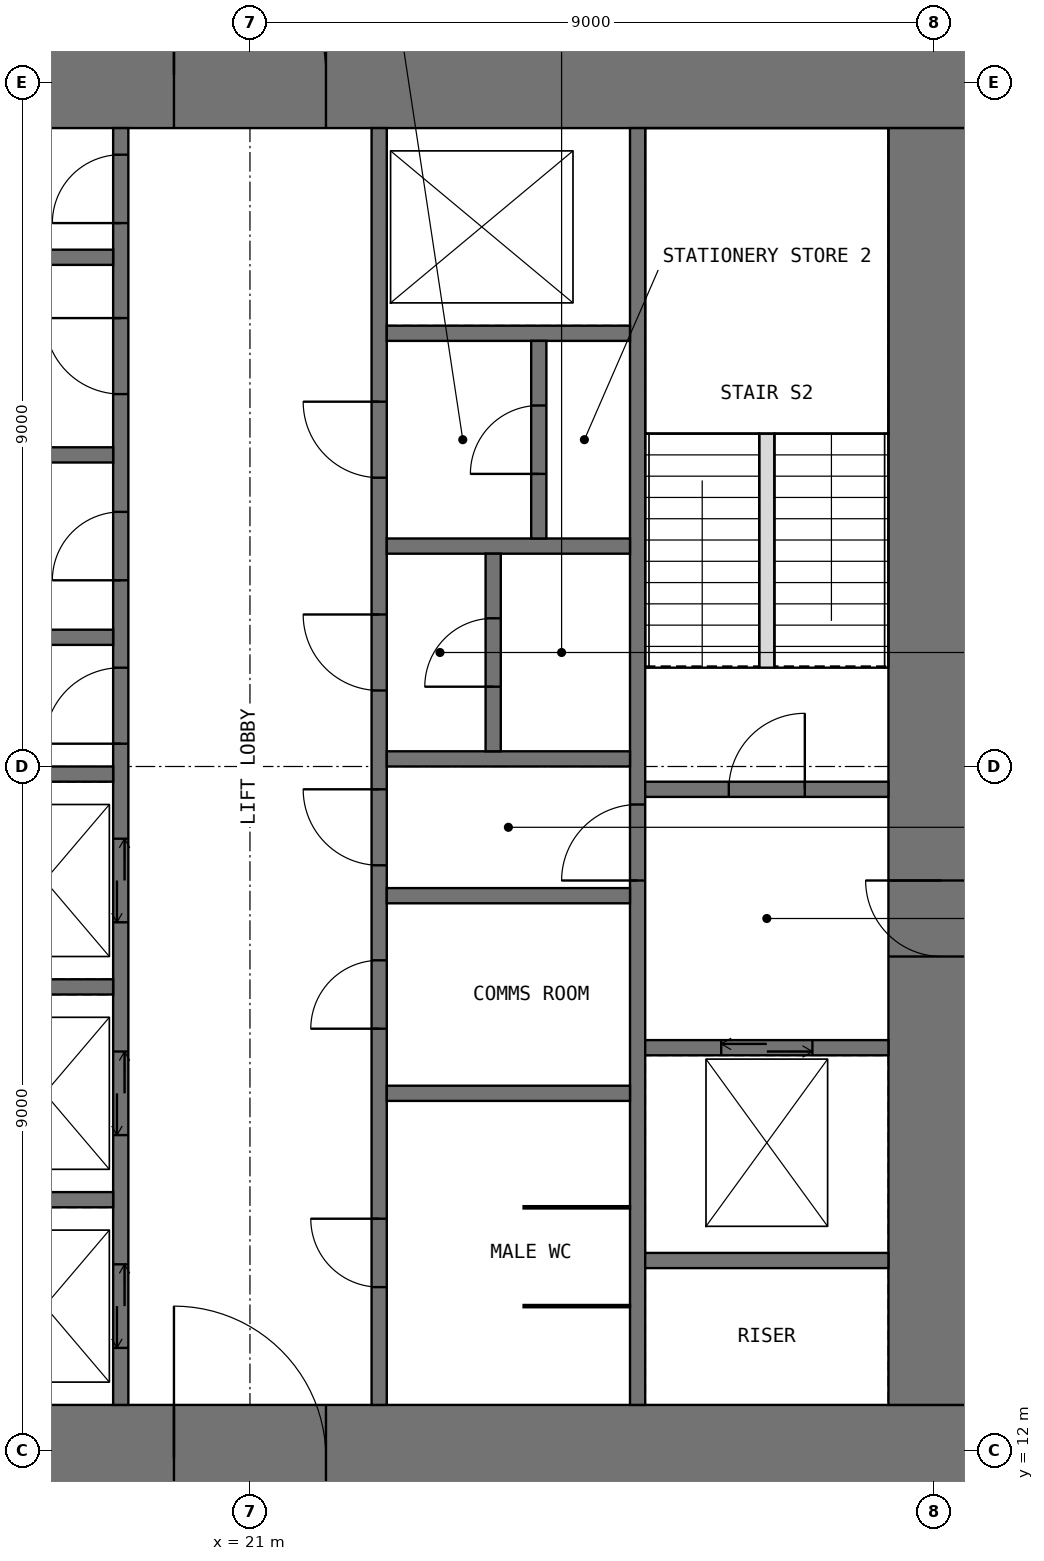
"""IFC4 building model, lengths in metres.
Left out: names, types, materials, properties, quantities, classifications, styles, units other than length and angle.
Written with IfcOpenShell. Run it as: python <this file> out.ifc"""

import sys

from ifc_helpers import new_model, si_unit, direction, frame, frame_2d, origin, place, context, subcontext, project, spatial, rectangle, extrude, element, fill, save


model = new_model("IFC4")
c1 = context("Model", 3, precision=1e-05, world=origin(), true_north=direction((0.0, 1.0)))
c2 = subcontext(c1, "Body", "Model", "MODEL_VIEW")
j1 = project(units=[si_unit("LENGTHUNIT", "METRE"), si_unit("PLANEANGLEUNIT", "RADIAN")], contexts=[c1])
p1 = place(None, origin())
s1 = spatial("IfcSite", under=j1, at=p1, CompositionType="ELEMENT")
p2 = place(p1, origin())
s2 = spatial("IfcBuilding", under=s1, at=p2, CompositionType="ELEMENT")
p3 = place(p2, frame((0.0, 0.0, 178.5)))
s3 = spatial("IfcBuildingStorey", under=s2, at=p3, CompositionType="ELEMENT", Elevation=178.5)
p4 = place(p3, frame((11.2, 11.9, -0.05), z_axis=(0.0, 0.0, 1.0), x_axis=(1.0, 0.0, 0.0)))
e1 = element("IfcWall", 1, at=p4, inside=s3, PredefinedType="SHEAR", context=c2, shape_type="SweptSolid", body=[
    extrude(rectangle(XDim=19.6, YDim=1.4, at=frame_2d((9.8, 0.0))), origin(), (0.0, 0.0, 1.0), 4.0),
])
p5 = place(p4, frame((8.8, 0.0, 0.05)))
e2 = element("IfcOpeningElement", 2, at=p5, cuts=e1, PredefinedType="OPENING", context=c2, shape_type="SweptSolid", body=[
    extrude(rectangle(XDim=2.0, YDim=2.2, at=frame_2d((1.0, 1.1))), frame((0.0, 0.71, 0.0), z_axis=(0.0, -1.0, 0.0), x_axis=(1.0, 0.0, 0.0)), (0.0, 0.0, 1.0), 1.42),
])
p6 = place(p3, frame((11.2, 30.1, -0.05), z_axis=(0.0, 0.0, 1.0), x_axis=(1.0, 0.0, 0.0)))
e3 = element("IfcWall", 3, at=p6, inside=s3, PredefinedType="SHEAR", context=c2, shape_type="SweptSolid", body=[
    extrude(rectangle(XDim=19.6, YDim=1.4, at=frame_2d((9.8, 0.0))), origin(), (0.0, 0.0, 1.0), 4.0),
])
p7 = place(p6, frame((8.8, 0.0, 0.05)))
e4 = element("IfcOpeningElement", 4, at=p7, cuts=e3, PredefinedType="OPENING", context=c2, shape_type="SweptSolid", body=[
    extrude(rectangle(XDim=2.0, YDim=2.2, at=frame_2d((1.0, 1.1))), frame((0.0, 0.71, 0.0), z_axis=(0.0, -1.0, 0.0), x_axis=(1.0, 0.0, 0.0)), (0.0, 0.0, 1.0), 1.42),
])
p8 = place(p3, frame((30.1, 12.6, -0.05), z_axis=(0.0, 0.0, 1.0), x_axis=(0.0, 1.0, 0.0)))
e5 = element("IfcWall", 5, at=p8, inside=s3, PredefinedType="SHEAR", context=c2, shape_type="SweptSolid", body=[
    extrude(rectangle(XDim=16.8, YDim=1.4, at=frame_2d((8.4, 0.0))), origin(), (0.0, 0.0, 1.0), 4.0),
])
p9 = place(p8, frame((5.9, 0.0, 0.05)))
e6 = element("IfcOpeningElement", 6, at=p9, cuts=e5, PredefinedType="OPENING", context=c2, shape_type="SweptSolid", body=[
    extrude(rectangle(XDim=1.0, YDim=2.2, at=frame_2d((0.5, 1.1))), frame((0.0, 0.71, 0.0), z_axis=(0.0, -1.0, 0.0), x_axis=(1.0, 0.0, 0.0)), (0.0, 0.0, 1.0), 1.42),
])
p10 = place(p3, frame((19.3, 12.6, -0.05), z_axis=(0.0, 0.0, 1.0), x_axis=(0.0, 1.0, 0.0)))
e7 = element("IfcWall", 7, at=p10, inside=s3, PredefinedType="SHEAR", context=c2, shape_type="SweptSolid", body=[
    extrude(rectangle(XDim=16.8, YDim=0.2, at=frame_2d((8.4, 0.0))), origin(), (0.0, 0.0, 1.0), 4.0),
])
p11 = place(p10, frame((8.7, 0.0, 0.05)))
e8 = element("IfcOpeningElement", 8, at=p11, cuts=e7, PredefinedType="OPENING", context=c2, shape_type="SweptSolid", body=[
    extrude(rectangle(XDim=1.0, YDim=2.2, at=frame_2d((0.5, 1.1))), frame((0.0, 0.11, 0.0), z_axis=(0.0, -1.0, 0.0), x_axis=(1.0, 0.0, 0.0)), (0.0, 0.0, 1.0), 0.22),
])
p12 = place(p10, frame((10.85, 0.0, 0.05)))
e9 = element("IfcOpeningElement", 9, at=p12, cuts=e7, PredefinedType="OPENING", context=c2, shape_type="SweptSolid", body=[
    extrude(rectangle(XDim=0.9, YDim=2.2, at=frame_2d((0.45, 1.1))), frame((0.0, 0.11, 0.0), z_axis=(0.0, -1.0, 0.0), x_axis=(1.0, 0.0, 0.0)), (0.0, 0.0, 1.0), 0.22),
])
p13 = place(p10, frame((13.3, 0.0, 0.05)))
e10 = element("IfcOpeningElement", 10, at=p13, cuts=e7, PredefinedType="OPENING", context=c2, shape_type="SweptSolid", body=[
    extrude(rectangle(XDim=1.0, YDim=2.2, at=frame_2d((0.5, 1.1))), frame((0.0, 0.11, 0.0), z_axis=(0.0, -1.0, 0.0), x_axis=(1.0, 0.0, 0.0)), (0.0, 0.0, 1.0), 0.22),
])
p14 = place(p10, frame((15.55, 0.0, 0.05)))
e11 = element("IfcOpeningElement", 11, at=p14, cuts=e7, PredefinedType="OPENING", context=c2, shape_type="SweptSolid", body=[
    extrude(rectangle(XDim=0.9, YDim=2.2, at=frame_2d((0.45, 1.1))), frame((0.0, 0.11, 0.0), z_axis=(0.0, -1.0, 0.0), x_axis=(1.0, 0.0, 0.0)), (0.0, 0.0, 1.0), 0.22),
])
p15 = place(p10, frame((0.75, 0.0, 0.05)))
e12 = element("IfcOpeningElement", 12, at=p15, cuts=e7, PredefinedType="OPENING", context=c2, shape_type="SweptSolid", body=[
    extrude(rectangle(XDim=1.1, YDim=2.2, at=frame_2d((0.55, 1.1))), frame((0.0, 0.11, 0.0), z_axis=(0.0, -1.0, 0.0), x_axis=(1.0, 0.0, 0.0)), (0.0, 0.0, 1.0), 0.22),
])
p16 = place(p10, frame((3.55, 0.0, 0.05)))
e13 = element("IfcOpeningElement", 13, at=p16, cuts=e7, PredefinedType="OPENING", context=c2, shape_type="SweptSolid", body=[
    extrude(rectangle(XDim=1.1, YDim=2.2, at=frame_2d((0.55, 1.1))), frame((0.0, 0.11, 0.0), z_axis=(0.0, -1.0, 0.0), x_axis=(1.0, 0.0, 0.0)), (0.0, 0.0, 1.0), 0.22),
])
p17 = place(p10, frame((6.35, 0.0, 0.05)))
e14 = element("IfcOpeningElement", 14, at=p17, cuts=e7, PredefinedType="OPENING", context=c2, shape_type="SweptSolid", body=[
    extrude(rectangle(XDim=1.1, YDim=2.2, at=frame_2d((0.55, 1.1))), frame((0.0, 0.11, 0.0), z_axis=(0.0, -1.0, 0.0), x_axis=(1.0, 0.0, 0.0)), (0.0, 0.0, 1.0), 0.22),
])
p18 = place(p3, frame((22.7, 12.6, -0.05), z_axis=(0.0, 0.0, 1.0), x_axis=(0.0, 1.0, 0.0)))
e15 = element("IfcWall", 15, at=p18, inside=s3, PredefinedType="SHEAR", context=c2, shape_type="SweptSolid", body=[
    extrude(rectangle(XDim=16.8, YDim=0.2, at=frame_2d((8.4, 0.0))), origin(), (0.0, 0.0, 1.0), 4.0),
])
p19 = place(p18, frame((7.1, 0.0, 0.05)))
e16 = element("IfcOpeningElement", 16, at=p19, cuts=e15, PredefinedType="OPENING", context=c2, shape_type="SweptSolid", body=[
    extrude(rectangle(XDim=1.0, YDim=2.2, at=frame_2d((0.5, 1.1))), frame((0.0, 0.11, 0.0), z_axis=(0.0, -1.0, 0.0), x_axis=(1.0, 0.0, 0.0)), (0.0, 0.0, 1.0), 0.22),
])
p20 = place(p18, frame((1.55, 0.0, 0.05)))
e17 = element("IfcOpeningElement", 17, at=p20, cuts=e15, PredefinedType="OPENING", context=c2, shape_type="SweptSolid", body=[
    extrude(rectangle(XDim=0.9, YDim=2.2, at=frame_2d((0.45, 1.1))), frame((0.0, 0.11, 0.0), z_axis=(0.0, -1.0, 0.0), x_axis=(1.0, 0.0, 0.0)), (0.0, 0.0, 1.0), 0.22),
])
p21 = place(p18, frame((4.95, 0.0, 0.05)))
e18 = element("IfcOpeningElement", 18, at=p21, cuts=e15, PredefinedType="OPENING", context=c2, shape_type="SweptSolid", body=[
    extrude(rectangle(XDim=0.9, YDim=2.2, at=frame_2d((0.45, 1.1))), frame((0.0, 0.11, 0.0), z_axis=(0.0, -1.0, 0.0), x_axis=(1.0, 0.0, 0.0)), (0.0, 0.0, 1.0), 0.22),
])
p22 = place(p18, frame((9.4, 0.0, 0.05)))
e19 = element("IfcOpeningElement", 19, at=p22, cuts=e15, PredefinedType="OPENING", context=c2, shape_type="SweptSolid", body=[
    extrude(rectangle(XDim=1.0, YDim=2.2, at=frame_2d((0.5, 1.1))), frame((0.0, 0.11, 0.0), z_axis=(0.0, -1.0, 0.0), x_axis=(1.0, 0.0, 0.0)), (0.0, 0.0, 1.0), 0.22),
])
p23 = place(p18, frame((12.2, 0.0, 0.05)))
e20 = element("IfcOpeningElement", 20, at=p23, cuts=e15, PredefinedType="OPENING", context=c2, shape_type="SweptSolid", body=[
    extrude(rectangle(XDim=1.0, YDim=2.2, at=frame_2d((0.5, 1.1))), frame((0.0, 0.11, 0.0), z_axis=(0.0, -1.0, 0.0), x_axis=(1.0, 0.0, 0.0)), (0.0, 0.0, 1.0), 0.22),
])
p24 = place(p3, frame((26.1, 12.6, -0.05), z_axis=(0.0, 0.0, 1.0), x_axis=(0.0, 1.0, 0.0)))
e21 = element("IfcWall", 21, at=p24, inside=s3, PredefinedType="SHEAR", context=c2, shape_type="SweptSolid", body=[
    extrude(rectangle(XDim=16.8, YDim=0.2, at=frame_2d((8.4, 0.0))), origin(), (0.0, 0.0, 1.0), 4.0),
])
p25 = place(p24, frame((6.9, 0.0, 0.05)))
e22 = element("IfcOpeningElement", 22, at=p25, cuts=e21, PredefinedType="OPENING", context=c2, shape_type="SweptSolid", body=[
    extrude(rectangle(XDim=1.0, YDim=2.2, at=frame_2d((0.5, 1.1))), frame((0.0, 0.11, 0.0), z_axis=(0.0, -1.0, 0.0), x_axis=(1.0, 0.0, 0.0)), (0.0, 0.0, 1.0), 0.22),
])
for number, where, z_axis, x_axis in (
    (23, (16.0, 15.3, -0.05), (0.0, 0.0, 1.0), (1.0, 0.0, 0.0)),
    (24, (16.0, 18.1, -0.05), (0.0, 0.0, 1.0), (1.0, 0.0, 0.0)),
    (25, (16.0, 20.9, -0.05), (0.0, 0.0, 1.0), (1.0, 0.0, 0.0)),
    (26, (16.0, 22.7, -0.05), (0.0, 0.0, 1.0), (1.0, 0.0, 0.0)),
    (27, (16.0, 25.1, -0.05), (0.0, 0.0, 1.0), (1.0, 0.0, 0.0)),
    (28, (16.0, 27.7, -0.05), (0.0, 0.0, 1.0), (1.0, 0.0, 0.0)),
    (29, (22.8, 16.7, -0.05), (0.0, 0.0, 1.0), (1.0, 0.0, 0.0)),
    (30, (22.8, 19.3, -0.05), (0.0, 0.0, 1.0), (1.0, 0.0, 0.0)),
    (31, (22.8, 21.1, -0.05), (0.0, 0.0, 1.0), (1.0, 0.0, 0.0)),
    (32, (22.8, 23.9, -0.05), (0.0, 0.0, 1.0), (1.0, 0.0, 0.0)),
    (33, (22.8, 26.7, -0.05), (0.0, 0.0, 1.0), (1.0, 0.0, 0.0)),
    (34, (26.2, 14.5, -0.05), (0.0, 0.0, 1.0), (1.0, 0.0, 0.0)),
):
    element("IfcWall", number, at=place(p3, frame(where, z_axis=z_axis, x_axis=x_axis)), inside=s3, PredefinedType="SHEAR", context=c2, shape_type="SweptSolid", body=[
        extrude(rectangle(XDim=3.2, YDim=0.2, at=frame_2d((1.6, 0.0))), origin(), (0.0, 0.0, 1.0), 4.0),
    ])
p26 = place(p3, frame((26.2, 17.3, -0.05), z_axis=(0.0, 0.0, 1.0), x_axis=(1.0, 0.0, 0.0)))
e35 = element("IfcWall", 35, at=p26, inside=s3, PredefinedType="SHEAR", context=c2, shape_type="SweptSolid", body=[
    extrude(rectangle(XDim=3.2, YDim=0.2, at=frame_2d((1.6, 0.0))), origin(), (0.0, 0.0, 1.0), 4.0),
])
p27 = place(p26, frame((1.0, 0.0, 0.05)))
e36 = element("IfcOpeningElement", 36, at=p27, cuts=e35, PredefinedType="OPENING", context=c2, shape_type="SweptSolid", body=[
    extrude(rectangle(XDim=1.2, YDim=2.2, at=frame_2d((0.6, 1.1))), frame((0.0, 0.11, 0.0), z_axis=(0.0, -1.0, 0.0), x_axis=(1.0, 0.0, 0.0)), (0.0, 0.0, 1.0), 0.22),
])
p28 = place(p3, frame((26.2, 20.7, -0.05), z_axis=(0.0, 0.0, 1.0), x_axis=(1.0, 0.0, 0.0)))
e37 = element("IfcWall", 37, at=p28, inside=s3, PredefinedType="SHEAR", context=c2, shape_type="SweptSolid", body=[
    extrude(rectangle(XDim=3.2, YDim=0.2, at=frame_2d((1.6, 0.0))), origin(), (0.0, 0.0, 1.0), 4.0),
])
p29 = place(p28, frame((1.1, 0.0, 0.05)))
e38 = element("IfcOpeningElement", 38, at=p29, cuts=e37, PredefinedType="OPENING", context=c2, shape_type="SweptSolid", body=[
    extrude(rectangle(XDim=1.0, YDim=2.2, at=frame_2d((0.5, 1.1))), frame((0.0, 0.11, 0.0), z_axis=(0.0, -1.0, 0.0), x_axis=(1.0, 0.0, 0.0)), (0.0, 0.0, 1.0), 0.22),
])
for number, where, z_axis, x_axis in (
    (39, (24.6, 13.9, 0.0), (0.0, 0.0, 1.0), (1.0, 0.0, 0.0)),
    (40, (24.6, 15.2, 0.0), (0.0, 0.0, 1.0), (1.0, 0.0, 0.0)),
):
    element("IfcWall", number, at=place(p3, frame(where, z_axis=z_axis, x_axis=x_axis)), inside=s3, PredefinedType="PARTITIONING", context=c2, shape_type="SweptSolid", body=[
        extrude(rectangle(XDim=1.4, YDim=0.03, at=frame_2d((0.7, 0.0))), origin(), (0.0, 0.0, 1.0), 3.75),
    ])
p30 = place(p3, frame((24.2, 21.2, -0.05), z_axis=(0.0, 0.0, 1.0), x_axis=(0.0, 1.0, 0.0)))
e41 = element("IfcWall", 41, at=p30, inside=s3, PredefinedType="SHEAR", context=c2, shape_type="SweptSolid", body=[
    extrude(rectangle(XDim=2.6, YDim=0.2, at=frame_2d((1.3, 0.0))), origin(), (0.0, 0.0, 1.0), 4.0),
])
p31 = place(p30, frame((0.85, 0.0, 0.05)))
e42 = element("IfcOpeningElement", 42, at=p31, cuts=e41, PredefinedType="OPENING", context=c2, shape_type="SweptSolid", body=[
    extrude(rectangle(XDim=0.9, YDim=2.2, at=frame_2d((0.45, 1.1))), frame((0.0, 0.11, 0.0), z_axis=(0.0, -1.0, 0.0), x_axis=(1.0, 0.0, 0.0)), (0.0, 0.0, 1.0), 0.22),
])
p32 = place(p3, frame((24.8, 24.0, -0.05), z_axis=(0.0, 0.0, 1.0), x_axis=(0.0, 1.0, 0.0)))
e43 = element("IfcWall", 43, at=p32, inside=s3, PredefinedType="SHEAR", context=c2, shape_type="SweptSolid", body=[
    extrude(rectangle(XDim=2.6, YDim=0.2, at=frame_2d((1.3, 0.0))), origin(), (0.0, 0.0, 1.0), 4.0),
])
p33 = place(p32, frame((0.85, 0.0, 0.05)))
e44 = element("IfcOpeningElement", 44, at=p33, cuts=e43, PredefinedType="OPENING", context=c2, shape_type="SweptSolid", body=[
    extrude(rectangle(XDim=0.9, YDim=2.2, at=frame_2d((0.45, 1.1))), frame((0.0, 0.11, 0.0), z_axis=(0.0, -1.0, 0.0), x_axis=(1.0, 0.0, 0.0)), (0.0, 0.0, 1.0), 0.22),
])
p34 = place(p3, frame((27.8, 22.3, 0.0), z_axis=(0.0, 0.0, 1.0), x_axis=(0.0, 1.0, 0.0)))
e45 = element("IfcWall", 45, at=p34, inside=s3, PredefinedType="PARTITIONING", context=c2, shape_type="SweptSolid", body=[
    extrude(rectangle(XDim=3.08, YDim=0.2, at=frame_2d((1.54, 0.0))), origin(), (0.0, 0.0, 1.0), 4.0),
])
p35 = place(p5, origin())
e46 = element("IfcDoor", 46, at=p35, inside=s3, OperationType="DOUBLE_DOOR_SINGLE_SWING", PredefinedType="DOOR", context=c2, shape_type="SweptSolid", body=[
    extrude(rectangle(XDim=2.0, YDim=2.2, at=frame_2d((1.0, 1.1))), frame((0.0, 0.025, 0.0), z_axis=(0.0, -1.0, 0.0), x_axis=(1.0, 0.0, 0.0)), (0.0, 0.0, 1.0), 0.05),
])
fill(e2, e46)
p36 = place(p7, origin())
e47 = element("IfcDoor", 47, at=p36, inside=s3, OperationType="DOUBLE_DOOR_SINGLE_SWING", PredefinedType="DOOR", context=c2, shape_type="SweptSolid", body=[
    extrude(rectangle(XDim=2.0, YDim=2.2, at=frame_2d((1.0, 1.1))), frame((0.0, 0.025, 0.0), z_axis=(0.0, -1.0, 0.0), x_axis=(1.0, 0.0, 0.0)), (0.0, 0.0, 1.0), 0.05),
])
fill(e4, e47)
p37 = place(p9, origin())
e48 = element("IfcDoor", 48, at=p37, inside=s3, OperationType="SINGLE_SWING_RIGHT", PredefinedType="DOOR", context=c2, shape_type="SweptSolid", body=[
    extrude(rectangle(XDim=1.0, YDim=2.2, at=frame_2d((0.5, 1.1))), frame((0.0, 0.025, 0.0), z_axis=(0.0, -1.0, 0.0), x_axis=(1.0, 0.0, 0.0)), (0.0, 0.0, 1.0), 0.05),
])
fill(e6, e48)
p38 = place(p29, origin())
e49 = element("IfcDoor", 49, at=p38, inside=s3, OperationType="SINGLE_SWING_RIGHT", PredefinedType="DOOR", context=c2, shape_type="SweptSolid", body=[
    extrude(rectangle(XDim=1.0, YDim=2.2, at=frame_2d((0.5, 1.1))), frame((0.0, 0.025, 0.0), z_axis=(0.0, -1.0, 0.0), x_axis=(1.0, 0.0, 0.0)), (0.0, 0.0, 1.0), 0.05),
])
fill(e38, e49)
p39 = place(p25, origin())
e50 = element("IfcDoor", 50, at=p39, inside=s3, OperationType="SINGLE_SWING_LEFT", PredefinedType="DOOR", context=c2, shape_type="SweptSolid", body=[
    extrude(rectangle(XDim=1.0, YDim=2.2, at=frame_2d((0.5, 1.1))), frame((0.0, 0.025, 0.0), z_axis=(0.0, -1.0, 0.0), x_axis=(1.0, 0.0, 0.0)), (0.0, 0.0, 1.0), 0.05),
])
fill(e22, e50)
p40 = place(p11, origin())
e51 = element("IfcDoor", 51, at=p40, inside=s3, OperationType="SINGLE_SWING_LEFT", PredefinedType="DOOR", context=c2, shape_type="SweptSolid", body=[
    extrude(rectangle(XDim=1.0, YDim=2.2, at=frame_2d((0.5, 1.1))), frame((0.0, 0.025, 0.0), z_axis=(0.0, -1.0, 0.0), x_axis=(1.0, 0.0, 0.0)), (0.0, 0.0, 1.0), 0.05),
])
fill(e8, e51)
p41 = place(p19, origin())
e52 = element("IfcDoor", 52, at=p41, inside=s3, OperationType="SINGLE_SWING_RIGHT", PredefinedType="DOOR", context=c2, shape_type="SweptSolid", body=[
    extrude(rectangle(XDim=1.0, YDim=2.2, at=frame_2d((0.5, 1.1))), frame((0.0, 0.025, 0.0), z_axis=(0.0, -1.0, 0.0), x_axis=(1.0, 0.0, 0.0)), (0.0, 0.0, 1.0), 0.05),
])
fill(e16, e52)
p42 = place(p12, origin())
e53 = element("IfcDoor", 53, at=p42, inside=s3, OperationType="SINGLE_SWING_LEFT", PredefinedType="DOOR", context=c2, shape_type="SweptSolid", body=[
    extrude(rectangle(XDim=0.9, YDim=2.2, at=frame_2d((0.45, 1.1))), frame((0.0, 0.025, 0.0), z_axis=(0.0, -1.0, 0.0), x_axis=(1.0, 0.0, 0.0)), (0.0, 0.0, 1.0), 0.05),
])
fill(e9, e53)
p43 = place(p13, origin())
e54 = element("IfcDoor", 54, at=p43, inside=s3, OperationType="SINGLE_SWING_RIGHT", PredefinedType="DOOR", context=c2, shape_type="SweptSolid", body=[
    extrude(rectangle(XDim=1.0, YDim=2.2, at=frame_2d((0.5, 1.1))), frame((0.0, 0.025, 0.0), z_axis=(0.0, -1.0, 0.0), x_axis=(1.0, 0.0, 0.0)), (0.0, 0.0, 1.0), 0.05),
])
fill(e10, e54)
p44 = place(p14, origin())
e55 = element("IfcDoor", 55, at=p44, inside=s3, OperationType="SINGLE_SWING_LEFT", PredefinedType="DOOR", context=c2, shape_type="SweptSolid", body=[
    extrude(rectangle(XDim=0.9, YDim=2.2, at=frame_2d((0.45, 1.1))), frame((0.0, 0.025, 0.0), z_axis=(0.0, -1.0, 0.0), x_axis=(1.0, 0.0, 0.0)), (0.0, 0.0, 1.0), 0.05),
])
fill(e11, e55)
p45 = place(p20, origin())
e56 = element("IfcDoor", 56, at=p45, inside=s3, OperationType="SINGLE_SWING_RIGHT", PredefinedType="DOOR", context=c2, shape_type="SweptSolid", body=[
    extrude(rectangle(XDim=0.9, YDim=2.2, at=frame_2d((0.45, 1.1))), frame((0.0, 0.025, 0.0), z_axis=(0.0, -1.0, 0.0), x_axis=(1.0, 0.0, 0.0)), (0.0, 0.0, 1.0), 0.05),
])
fill(e17, e56)
p46 = place(p21, origin())
e57 = element("IfcDoor", 57, at=p46, inside=s3, OperationType="SINGLE_SWING_LEFT", PredefinedType="DOOR", context=c2, shape_type="SweptSolid", body=[
    extrude(rectangle(XDim=0.9, YDim=2.2, at=frame_2d((0.45, 1.1))), frame((0.0, 0.025, 0.0), z_axis=(0.0, -1.0, 0.0), x_axis=(1.0, 0.0, 0.0)), (0.0, 0.0, 1.0), 0.05),
])
fill(e18, e57)
p47 = place(p22, origin())
e58 = element("IfcDoor", 58, at=p47, inside=s3, OperationType="SINGLE_SWING_RIGHT", PredefinedType="DOOR", context=c2, shape_type="SweptSolid", body=[
    extrude(rectangle(XDim=1.0, YDim=2.2, at=frame_2d((0.5, 1.1))), frame((0.0, 0.025, 0.0), z_axis=(0.0, -1.0, 0.0), x_axis=(1.0, 0.0, 0.0)), (0.0, 0.0, 1.0), 0.05),
])
fill(e19, e58)
p48 = place(p31, origin())
e59 = element("IfcDoor", 59, at=p48, inside=s3, OperationType="SINGLE_SWING_LEFT", PredefinedType="DOOR", context=c2, shape_type="SweptSolid", body=[
    extrude(rectangle(XDim=0.9, YDim=2.2, at=frame_2d((0.45, 1.1))), frame((0.0, 0.025, 0.0), z_axis=(0.0, -1.0, 0.0), x_axis=(1.0, 0.0, 0.0)), (0.0, 0.0, 1.0), 0.05),
])
fill(e42, e59)
p49 = place(p23, origin())
e60 = element("IfcDoor", 60, at=p49, inside=s3, OperationType="SINGLE_SWING_RIGHT", PredefinedType="DOOR", context=c2, shape_type="SweptSolid", body=[
    extrude(rectangle(XDim=1.0, YDim=2.2, at=frame_2d((0.5, 1.1))), frame((0.0, 0.025, 0.0), z_axis=(0.0, -1.0, 0.0), x_axis=(1.0, 0.0, 0.0)), (0.0, 0.0, 1.0), 0.05),
])
fill(e20, e60)
p50 = place(p33, origin())
e61 = element("IfcDoor", 61, at=p50, inside=s3, OperationType="SINGLE_SWING_LEFT", PredefinedType="DOOR", context=c2, shape_type="SweptSolid", body=[
    extrude(rectangle(XDim=0.9, YDim=2.2, at=frame_2d((0.45, 1.1))), frame((0.0, 0.025, 0.0), z_axis=(0.0, -1.0, 0.0), x_axis=(1.0, 0.0, 0.0)), (0.0, 0.0, 1.0), 0.05),
])
fill(e44, e61)
p51 = place(p15, origin())
e62 = element("IfcDoor", 62, at=p51, inside=s3, OperationType="DOUBLE_DOOR_SLIDING", PredefinedType="DOOR", context=c2, shape_type="SweptSolid", body=[
    extrude(rectangle(XDim=1.1, YDim=2.2, at=frame_2d((0.55, 1.1))), frame((0.0, 0.025, 0.0), z_axis=(0.0, -1.0, 0.0), x_axis=(1.0, 0.0, 0.0)), (0.0, 0.0, 1.0), 0.05),
])
fill(e12, e62)
p52 = place(p16, origin())
e63 = element("IfcDoor", 63, at=p52, inside=s3, OperationType="DOUBLE_DOOR_SLIDING", PredefinedType="DOOR", context=c2, shape_type="SweptSolid", body=[
    extrude(rectangle(XDim=1.1, YDim=2.2, at=frame_2d((0.55, 1.1))), frame((0.0, 0.025, 0.0), z_axis=(0.0, -1.0, 0.0), x_axis=(1.0, 0.0, 0.0)), (0.0, 0.0, 1.0), 0.05),
])
fill(e13, e63)
p53 = place(p17, origin())
e64 = element("IfcDoor", 64, at=p53, inside=s3, OperationType="DOUBLE_DOOR_SLIDING", PredefinedType="DOOR", context=c2, shape_type="SweptSolid", body=[
    extrude(rectangle(XDim=1.1, YDim=2.2, at=frame_2d((0.55, 1.1))), frame((0.0, 0.025, 0.0), z_axis=(0.0, -1.0, 0.0), x_axis=(1.0, 0.0, 0.0)), (0.0, 0.0, 1.0), 0.05),
])
fill(e14, e64)
p54 = place(p27, origin())
e65 = element("IfcDoor", 65, at=p54, inside=s3, OperationType="DOUBLE_DOOR_SLIDING", PredefinedType="DOOR", context=c2, shape_type="SweptSolid", body=[
    extrude(rectangle(XDim=1.2, YDim=2.2, at=frame_2d((0.6, 1.1))), frame((0.0, 0.025, 0.0), z_axis=(0.0, -1.0, 0.0), x_axis=(1.0, 0.0, 0.0)), (0.0, 0.0, 1.0), 0.05),
])
fill(e36, e65)
save(model, sys.argv[1])
